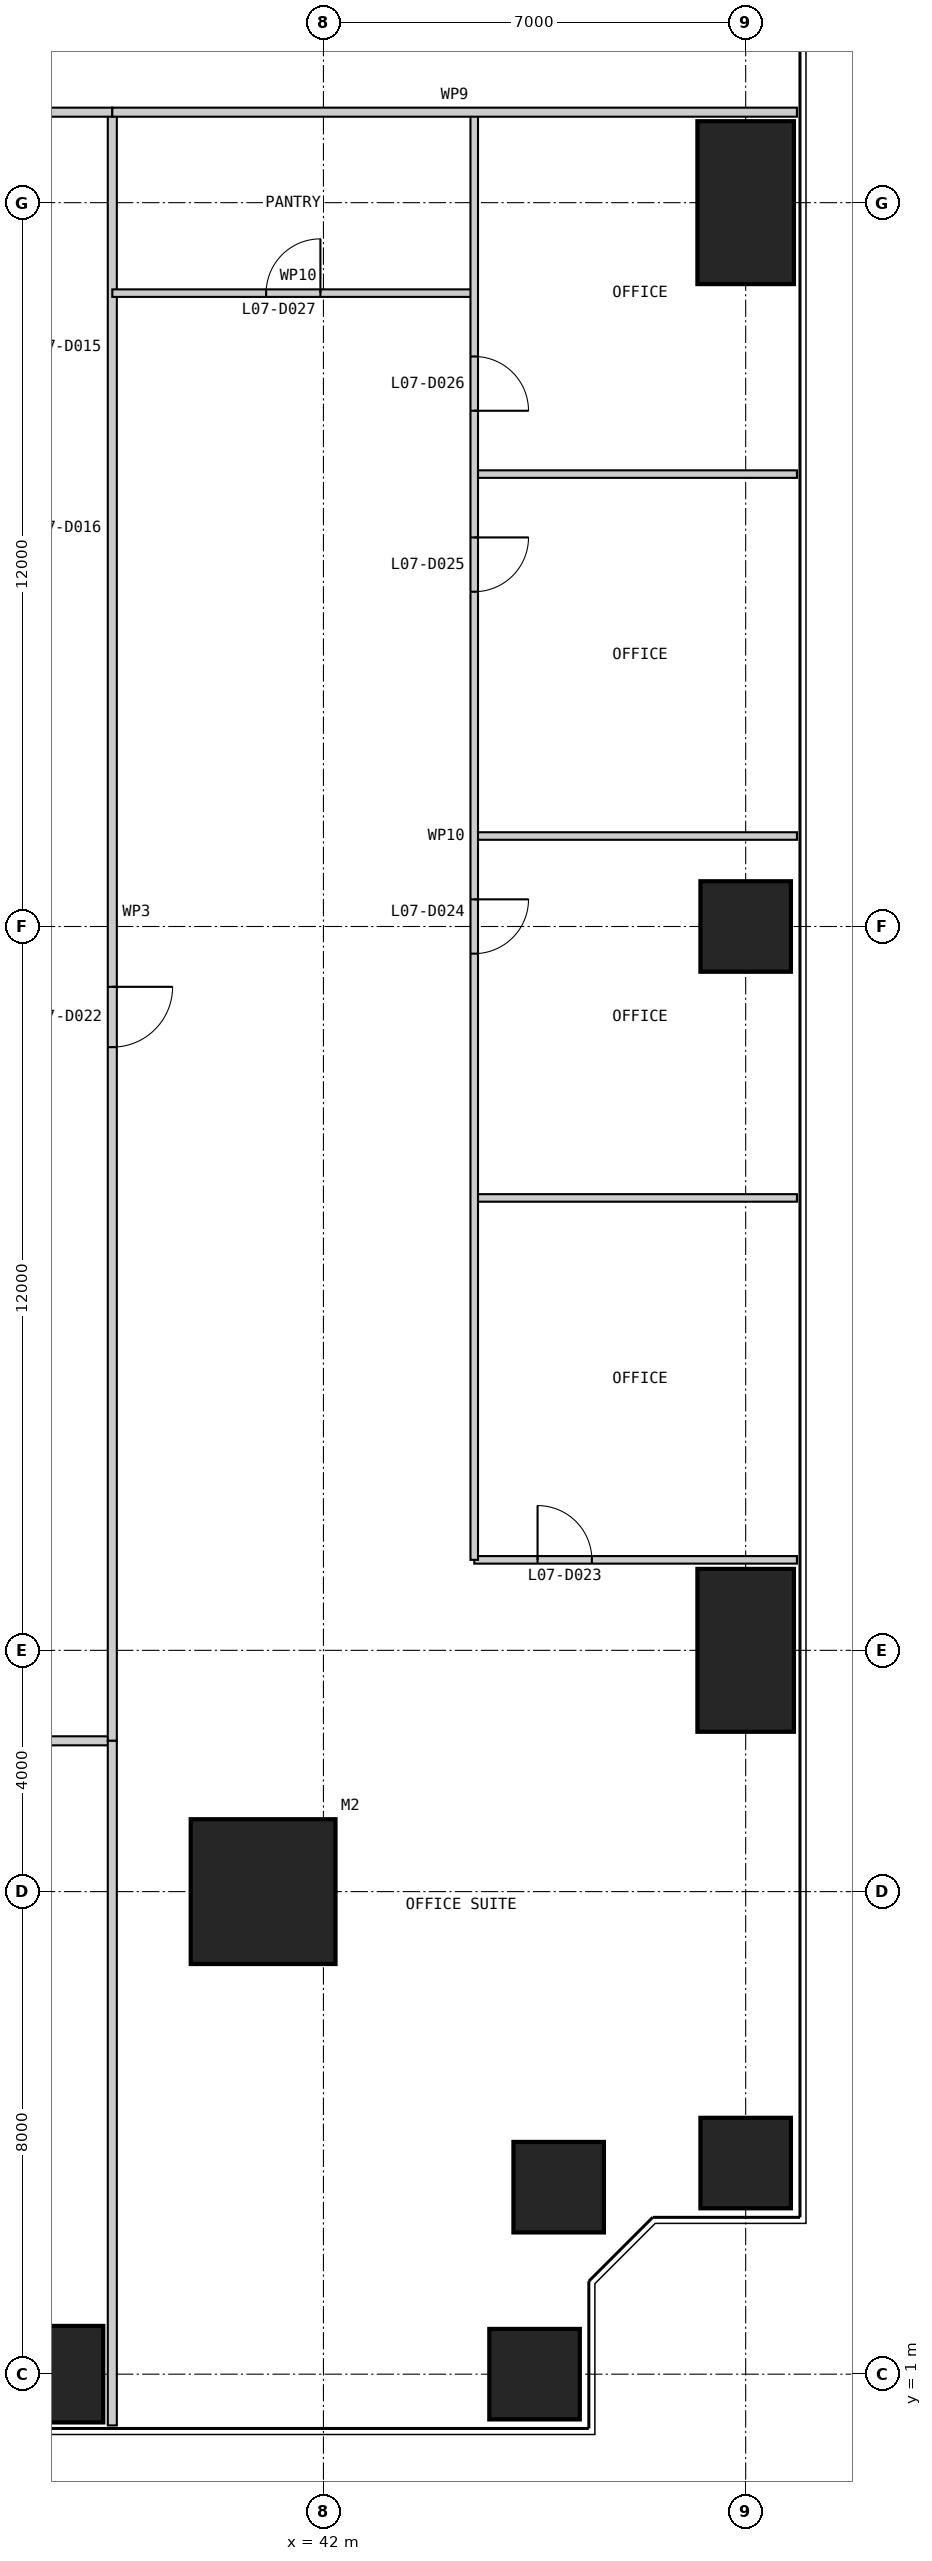
"""IFC4 building model, lengths in metres.
Left out: names, types, materials, properties, quantities, classifications, styles, units other than length and angle.
Written with IfcOpenShell. Run it as: python <this file> out.ifc"""

import sys

from ifc_helpers import new_model, si_unit, direction, frame, frame_2d, origin, origin_2d, place, context, subcontext, project, spatial, rectangle, extrude, element, fill, save


model = new_model("IFC4")
c1 = context("Model", 3, precision=1e-05, world=origin(), true_north=direction((0.0, 1.0)))
c2 = subcontext(c1, "Body", "Model", "MODEL_VIEW")
j1 = project(units=[si_unit("LENGTHUNIT", "METRE"), si_unit("PLANEANGLEUNIT", "RADIAN")], contexts=[c1])
p1 = place(None, origin())
s1 = spatial("IfcSite", under=j1, at=p1, CompositionType="ELEMENT")
p2 = place(p1, origin())
s2 = spatial("IfcBuilding", under=s1, at=p2, CompositionType="ELEMENT")
p3 = place(p2, frame((0.0, 0.0, 35.0)))
s3 = spatial("IfcBuildingStorey", under=s2, at=p3, CompositionType="ELEMENT", Elevation=35.0)
p4 = place(p3, frame((41.0, 9.0, 0.0), z_axis=(0.0, 0.0, 1.0), x_axis=(1.0, 0.0, 0.0)))
e1 = element("IfcColumn", 1, at=p4, inside=s3, PredefinedType="COLUMN", context=c2, shape_type="SweptSolid", body=[
    extrude(rectangle(XDim=2.4, YDim=2.4, at=origin_2d()), origin(), (0.0, 0.0, 1.0), 4.0),
])
p5 = place(p3, frame((37.0, 1.0, 0.0), z_axis=(0.0, 0.0, 1.0), x_axis=(1.0, 0.0, 0.0)))
e2 = element("IfcColumn", 2, at=p5, inside=s3, PredefinedType="COLUMN", context=c2, shape_type="SweptSolid", body=[
    extrude(rectangle(XDim=2.7, YDim=1.6, at=origin_2d()), origin(), (0.0, 0.0, 1.0), 4.0),
])
for number, where, z_axis, x_axis in (
    (3, (45.5, 1.0, 0.0), (0.0, 0.0, 1.0), (1.0, 0.0, 0.0)),
    (4, (45.9, 4.1, 0.0), (0.0, 0.0, 1.0), (1.0, 0.0, 0.0)),
    (5, (49.0, 4.5, 0.0), (0.0, 0.0, 1.0), (1.0, 0.0, 0.0)),
):
    element("IfcColumn", number, at=place(p3, frame(where, z_axis=z_axis, x_axis=x_axis)), inside=s3, PredefinedType="COLUMN", context=c2, shape_type="SweptSolid", body=[
        extrude(rectangle(XDim=1.5, YDim=1.5, at=origin_2d()), origin(), (0.0, 0.0, 1.0), 4.0),
    ])
p6 = place(p3, frame((49.0, 13.0, 0.0), z_axis=(0.0, 0.0, 1.0), x_axis=(1.0, 0.0, 0.0)))
e6 = element("IfcColumn", 6, at=p6, inside=s3, PredefinedType="COLUMN", context=c2, shape_type="SweptSolid", body=[
    extrude(rectangle(XDim=1.6, YDim=2.7, at=origin_2d()), origin(), (0.0, 0.0, 1.0), 4.0),
])
p7 = place(p3, frame((49.0, 25.0, 0.0), z_axis=(0.0, 0.0, 1.0), x_axis=(1.0, 0.0, 0.0)))
e7 = element("IfcColumn", 7, at=p7, inside=s3, PredefinedType="COLUMN", context=c2, shape_type="SweptSolid", body=[
    extrude(rectangle(XDim=1.5, YDim=1.5, at=origin_2d()), origin(), (0.0, 0.0, 1.0), 4.0),
])
p8 = place(p3, frame((49.0, 37.0, 0.0), z_axis=(0.0, 0.0, 1.0), x_axis=(1.0, 0.0, 0.0)))
e8 = element("IfcColumn", 8, at=p8, inside=s3, PredefinedType="COLUMN", context=c2, shape_type="SweptSolid", body=[
    extrude(rectangle(XDim=1.6, YDim=2.7, at=origin_2d()), origin(), (0.0, 0.0, 1.0), 4.0),
])
p9 = place(p3, frame((11.5, 11.5, 0.0), z_axis=(0.0, 0.0, 1.0), x_axis=(1.0, 0.0, 0.0)))
e9 = element("IfcWall", 9, at=p9, inside=s3, PredefinedType="PARTITIONING", context=c2, shape_type="SweptSolid", body=[
    extrude(rectangle(XDim=27.0, YDim=0.15, at=frame_2d((13.5, 0.0))), origin(), (0.0, 0.0, 1.0), 3.85),
])
p10 = place(p9, frame((4.0, 0.0, 0.0)))
e10 = element("IfcOpeningElement", 10, at=p10, cuts=e9, PredefinedType="OPENING", context=c2, shape_type="SweptSolid", body=[
    extrude(rectangle(XDim=1.0, YDim=2.2, at=frame_2d((0.5, 1.1))), frame((0.0, 0.085, 0.0), z_axis=(0.0, -1.0, 0.0), x_axis=(1.0, 0.0, 0.0)), (0.0, 0.0, 1.0), 0.17),
])
p11 = place(p9, frame((10.0, 0.0, 0.0)))
e11 = element("IfcOpeningElement", 11, at=p11, cuts=e9, PredefinedType="OPENING", context=c2, shape_type="SweptSolid", body=[
    extrude(rectangle(XDim=1.0, YDim=2.2, at=frame_2d((0.5, 1.1))), frame((0.0, 0.085, 0.0), z_axis=(0.0, -1.0, 0.0), x_axis=(1.0, 0.0, 0.0)), (0.0, 0.0, 1.0), 0.17),
])
p12 = place(p9, frame((17.5, 0.0, 0.0)))
e12 = element("IfcOpeningElement", 12, at=p12, cuts=e9, PredefinedType="OPENING", context=c2, shape_type="SweptSolid", body=[
    extrude(rectangle(XDim=1.0, YDim=2.2, at=frame_2d((0.5, 1.1))), frame((0.0, 0.085, 0.0), z_axis=(0.0, -1.0, 0.0), x_axis=(1.0, 0.0, 0.0)), (0.0, 0.0, 1.0), 0.17),
])
p13 = place(p9, frame((23.5, 0.0, 0.0)))
e13 = element("IfcOpeningElement", 13, at=p13, cuts=e9, PredefinedType="OPENING", context=c2, shape_type="SweptSolid", body=[
    extrude(rectangle(XDim=1.0, YDim=2.2, at=frame_2d((0.5, 1.1))), frame((0.0, 0.085, 0.0), z_axis=(0.0, -1.0, 0.0), x_axis=(1.0, 0.0, 0.0)), (0.0, 0.0, 1.0), 0.17),
])
p14 = place(p3, frame((38.5, 11.5, 0.0), z_axis=(0.0, 0.0, 1.0), x_axis=(0.0, 1.0, 0.0)))
e14 = element("IfcWall", 14, at=p14, inside=s3, PredefinedType="PARTITIONING", context=c2, shape_type="SweptSolid", body=[
    extrude(rectangle(XDim=27.0, YDim=0.15, at=frame_2d((13.5, 0.0))), origin(), (0.0, 0.0, 1.0), 3.85),
])
p15 = place(p14, frame((11.5, 0.0, 0.0)))
e15 = element("IfcOpeningElement", 15, at=p15, cuts=e14, PredefinedType="OPENING", context=c2, shape_type="SweptSolid", body=[
    extrude(rectangle(XDim=1.0, YDim=2.2, at=frame_2d((0.5, 1.1))), frame((0.0, 0.085, 0.0), z_axis=(0.0, -1.0, 0.0), x_axis=(1.0, 0.0, 0.0)), (0.0, 0.0, 1.0), 0.17),
])
p16 = place(p3, frame((38.5, 0.15, 0.0), z_axis=(0.0, 0.0, 1.0), x_axis=(0.0, 1.0, 0.0)))
e16 = element("IfcWall", 16, at=p16, inside=s3, PredefinedType="PARTITIONING", context=c2, shape_type="SweptSolid", body=[
    extrude(rectangle(XDim=11.35, YDim=0.15, at=frame_2d((5.675, 0.0))), origin(), (0.0, 0.0, 1.0), 3.85),
])
p17 = place(p3, frame((49.85, 14.5, 0.0), z_axis=(0.0, 0.0, 1.0), x_axis=(-1.0, 0.0, 0.0)))
e17 = element("IfcWall", 17, at=p17, inside=s3, PredefinedType="PARTITIONING", context=c2, shape_type="SweptSolid", body=[
    extrude(rectangle(XDim=5.35, YDim=0.125, at=frame_2d((2.675, 0.0))), origin(), (0.0, 0.0, 1.0), 3.85),
])
p18 = place(p17, frame((3.4, 0.0, 0.0)))
e18 = element("IfcOpeningElement", 18, at=p18, cuts=e17, PredefinedType="OPENING", context=c2, shape_type="SweptSolid", body=[
    extrude(rectangle(XDim=0.9, YDim=2.2, at=frame_2d((0.45, 1.1))), frame((0.0, 0.073, 0.0), z_axis=(0.0, -1.0, 0.0), x_axis=(1.0, 0.0, 0.0)), (0.0, 0.0, 1.0), 0.145),
])
for number, where, z_axis, x_axis in (
    (19, (49.85, 20.5, 0.0), (0.0, 0.0, 1.0), (-1.0, 0.0, 0.0)),
    (20, (49.85, 26.5, 0.0), (0.0, 0.0, 1.0), (-1.0, 0.0, 0.0)),
    (21, (49.85, 32.5, 0.0), (0.0, 0.0, 1.0), (-1.0, 0.0, 0.0)),
):
    element("IfcWall", number, at=place(p3, frame(where, z_axis=z_axis, x_axis=x_axis)), inside=s3, PredefinedType="PARTITIONING", context=c2, shape_type="SweptSolid", body=[
        extrude(rectangle(XDim=5.35, YDim=0.125, at=frame_2d((2.675, 0.0))), origin(), (0.0, 0.0, 1.0), 3.85),
    ])
p19 = place(p3, frame((44.5, 35.5, 0.0), z_axis=(0.0, 0.0, 1.0), x_axis=(-1.0, 0.0, 0.0)))
e22 = element("IfcWall", 22, at=p19, inside=s3, PredefinedType="PARTITIONING", context=c2, shape_type="SweptSolid", body=[
    extrude(rectangle(XDim=6.0, YDim=0.125, at=frame_2d((3.0, 0.0))), origin(), (0.0, 0.0, 1.0), 3.85),
])
p20 = place(p19, frame((2.55, 0.0, 0.0)))
e23 = element("IfcOpeningElement", 23, at=p20, cuts=e22, PredefinedType="OPENING", context=c2, shape_type="SweptSolid", body=[
    extrude(rectangle(XDim=0.9, YDim=2.2, at=frame_2d((0.45, 1.1))), frame((0.0, 0.073, 0.0), z_axis=(0.0, -1.0, 0.0), x_axis=(1.0, 0.0, 0.0)), (0.0, 0.0, 1.0), 0.145),
])
p21 = place(p3, frame((44.5, 14.5, 0.0), z_axis=(0.0, 0.0, 1.0), x_axis=(0.0, 1.0, 0.0)))
e24 = element("IfcWall", 24, at=p21, inside=s3, PredefinedType="PARTITIONING", context=c2, shape_type="SweptSolid", body=[
    extrude(rectangle(XDim=24.0, YDim=0.125, at=frame_2d((12.0, 0.0))), origin(), (0.0, 0.0, 1.0), 3.85),
])
p22 = place(p21, frame((10.05, 0.0, 0.0)))
e25 = element("IfcOpeningElement", 25, at=p22, cuts=e24, PredefinedType="OPENING", context=c2, shape_type="SweptSolid", body=[
    extrude(rectangle(XDim=0.9, YDim=2.2, at=frame_2d((0.45, 1.1))), frame((0.0, 0.073, 0.0), z_axis=(0.0, -1.0, 0.0), x_axis=(1.0, 0.0, 0.0)), (0.0, 0.0, 1.0), 0.145),
])
p23 = place(p21, frame((16.05, 0.0, 0.0)))
e26 = element("IfcOpeningElement", 26, at=p23, cuts=e24, PredefinedType="OPENING", context=c2, shape_type="SweptSolid", body=[
    extrude(rectangle(XDim=0.9, YDim=2.2, at=frame_2d((0.45, 1.1))), frame((0.0, 0.073, 0.0), z_axis=(0.0, -1.0, 0.0), x_axis=(1.0, 0.0, 0.0)), (0.0, 0.0, 1.0), 0.145),
])
p24 = place(p21, frame((19.05, 0.0, 0.0)))
e27 = element("IfcOpeningElement", 27, at=p24, cuts=e24, PredefinedType="OPENING", context=c2, shape_type="SweptSolid", body=[
    extrude(rectangle(XDim=0.9, YDim=2.2, at=frame_2d((0.45, 1.1))), frame((0.0, 0.073, 0.0), z_axis=(0.0, -1.0, 0.0), x_axis=(1.0, 0.0, 0.0)), (0.0, 0.0, 1.0), 0.145),
])
p25 = place(p3, frame((38.5, 38.5, 0.0), z_axis=(0.0, 0.0, 1.0), x_axis=(-1.0, 0.0, 0.0)))
e28 = element("IfcWall", 28, at=p25, inside=s3, PredefinedType="PARTITIONING", context=c2, shape_type="SweptSolid", body=[
    extrude(rectangle(XDim=27.0, YDim=0.15, at=frame_2d((13.5, 0.0))), origin(), (0.0, 0.0, 1.0), 3.85),
])
p26 = place(p25, frame((2.5, 0.0, 0.0)))
e29 = element("IfcOpeningElement", 29, at=p26, cuts=e28, PredefinedType="OPENING", context=c2, shape_type="SweptSolid", body=[
    extrude(rectangle(XDim=1.0, YDim=2.2, at=frame_2d((0.5, 1.1))), frame((0.0, 0.085, 0.0), z_axis=(0.0, -1.0, 0.0), x_axis=(1.0, 0.0, 0.0)), (0.0, 0.0, 1.0), 0.17),
])
p27 = place(p25, frame((13.0, 0.0, 0.0)))
e30 = element("IfcOpeningElement", 30, at=p27, cuts=e28, PredefinedType="OPENING", context=c2, shape_type="SweptSolid", body=[
    extrude(rectangle(XDim=1.0, YDim=2.2, at=frame_2d((0.5, 1.1))), frame((0.0, 0.085, 0.0), z_axis=(0.0, -1.0, 0.0), x_axis=(1.0, 0.0, 0.0)), (0.0, 0.0, 1.0), 0.17),
])
p28 = place(p25, frame((23.5, 0.0, 0.0)))
e31 = element("IfcOpeningElement", 31, at=p28, cuts=e28, PredefinedType="OPENING", context=c2, shape_type="SweptSolid", body=[
    extrude(rectangle(XDim=1.0, YDim=2.2, at=frame_2d((0.5, 1.1))), frame((0.0, 0.085, 0.0), z_axis=(0.0, -1.0, 0.0), x_axis=(1.0, 0.0, 0.0)), (0.0, 0.0, 1.0), 0.17),
])
p29 = place(p3, frame((49.85, 38.5, 0.0), z_axis=(0.0, 0.0, 1.0), x_axis=(-1.0, 0.0, 0.0)))
e32 = element("IfcWall", 32, at=p29, inside=s3, PredefinedType="PARTITIONING", context=c2, shape_type="SweptSolid", body=[
    extrude(rectangle(XDim=11.35, YDim=0.15, at=frame_2d((5.675, 0.0))), origin(), (0.0, 0.0, 1.0), 3.85),
])
p30 = place(p15, frame((1.0, 0.0, 0.0), z_axis=(0.0, 0.0, 1.0), x_axis=(-1.0, 0.0, 0.0)))
e33 = element("IfcDoor", 33, at=p30, inside=s3, OperationType="SINGLE_SWING_LEFT", PredefinedType="DOOR", context=c2, shape_type="SweptSolid", body=[
    extrude(rectangle(XDim=1.0, YDim=2.2, at=frame_2d((0.5, 1.1))), frame((0.0, 0.025, 0.0), z_axis=(0.0, -1.0, 0.0), x_axis=(1.0, 0.0, 0.0)), (0.0, 0.0, 1.0), 0.05),
])
fill(e15, e33)
p31 = place(p18, frame((0.9, 0.0, 0.0), z_axis=(0.0, 0.0, 1.0), x_axis=(-1.0, 0.0, 0.0)))
e34 = element("IfcDoor", 34, at=p31, inside=s3, OperationType="SINGLE_SWING_LEFT", PredefinedType="DOOR", context=c2, shape_type="SweptSolid", body=[
    extrude(rectangle(XDim=0.9, YDim=2.2, at=frame_2d((0.45, 1.1))), frame((0.0, 0.025, 0.0), z_axis=(0.0, -1.0, 0.0), x_axis=(1.0, 0.0, 0.0)), (0.0, 0.0, 1.0), 0.05),
])
fill(e18, e34)
p32 = place(p22, frame((0.9, 0.0, 0.0), z_axis=(0.0, 0.0, 1.0), x_axis=(-1.0, 0.0, 0.0)))
e35 = element("IfcDoor", 35, at=p32, inside=s3, OperationType="SINGLE_SWING_LEFT", PredefinedType="DOOR", context=c2, shape_type="SweptSolid", body=[
    extrude(rectangle(XDim=0.9, YDim=2.2, at=frame_2d((0.45, 1.1))), frame((0.0, 0.025, 0.0), z_axis=(0.0, -1.0, 0.0), x_axis=(1.0, 0.0, 0.0)), (0.0, 0.0, 1.0), 0.05),
])
fill(e25, e35)
p33 = place(p23, frame((0.9, 0.0, 0.0), z_axis=(0.0, 0.0, 1.0), x_axis=(-1.0, 0.0, 0.0)))
e36 = element("IfcDoor", 36, at=p33, inside=s3, OperationType="SINGLE_SWING_LEFT", PredefinedType="DOOR", context=c2, shape_type="SweptSolid", body=[
    extrude(rectangle(XDim=0.9, YDim=2.2, at=frame_2d((0.45, 1.1))), frame((0.0, 0.025, 0.0), z_axis=(0.0, -1.0, 0.0), x_axis=(1.0, 0.0, 0.0)), (0.0, 0.0, 1.0), 0.05),
])
fill(e26, e36)
p34 = place(p24, frame((0.9, 0.0, 0.0), z_axis=(0.0, 0.0, 1.0), x_axis=(-1.0, 0.0, 0.0)))
e37 = element("IfcDoor", 37, at=p34, inside=s3, OperationType="SINGLE_SWING_RIGHT", PredefinedType="DOOR", context=c2, shape_type="SweptSolid", body=[
    extrude(rectangle(XDim=0.9, YDim=2.2, at=frame_2d((0.45, 1.1))), frame((0.0, 0.025, 0.0), z_axis=(0.0, -1.0, 0.0), x_axis=(1.0, 0.0, 0.0)), (0.0, 0.0, 1.0), 0.05),
])
fill(e27, e37)
p35 = place(p20, frame((0.9, 0.0, 0.0), z_axis=(0.0, 0.0, 1.0), x_axis=(-1.0, 0.0, 0.0)))
e38 = element("IfcDoor", 38, at=p35, inside=s3, OperationType="SINGLE_SWING_RIGHT", PredefinedType="DOOR", context=c2, shape_type="SweptSolid", body=[
    extrude(rectangle(XDim=0.9, YDim=2.2, at=frame_2d((0.45, 1.1))), frame((0.0, 0.025, 0.0), z_axis=(0.0, -1.0, 0.0), x_axis=(1.0, 0.0, 0.0)), (0.0, 0.0, 1.0), 0.05),
])
fill(e23, e38)
save(model, sys.argv[1])
